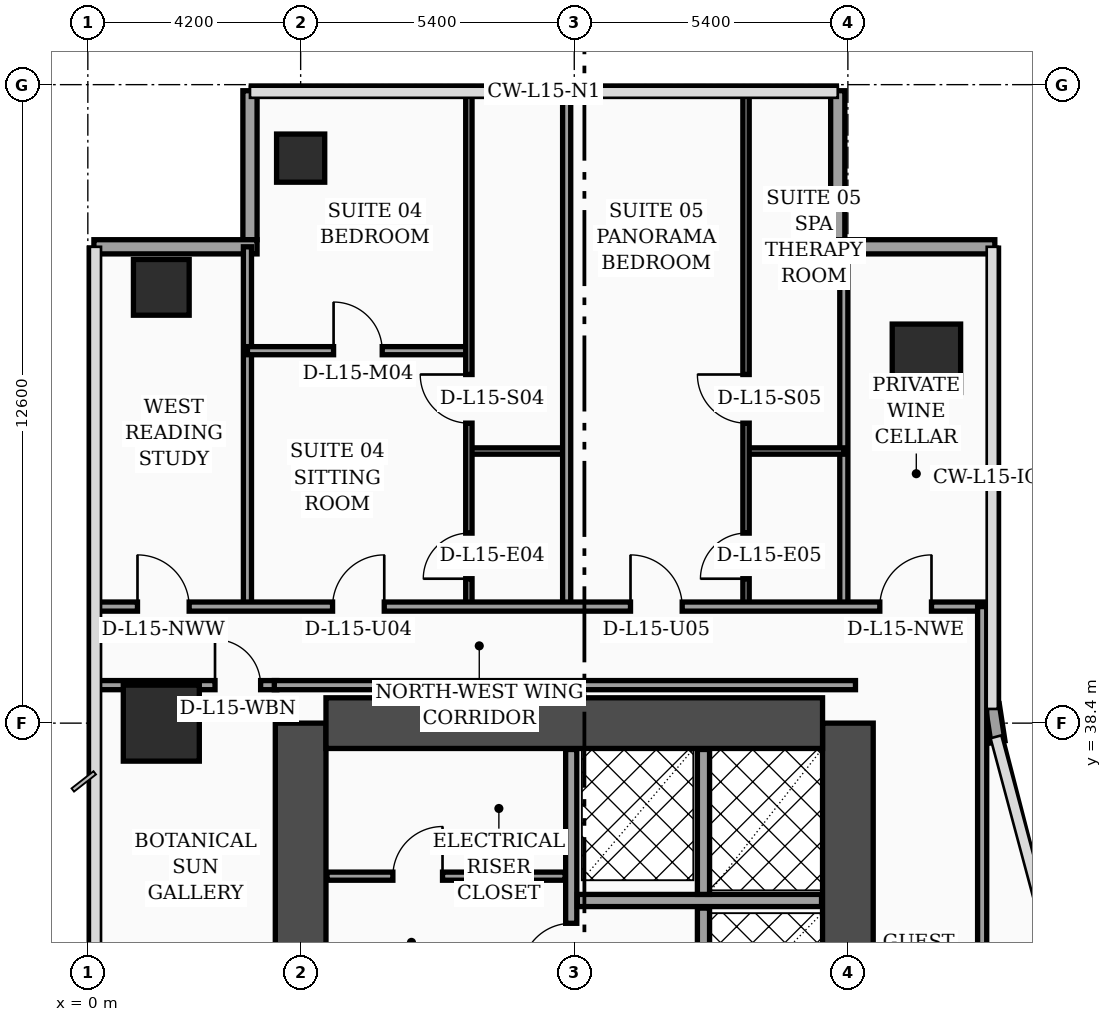
"""IFC4 building model, lengths in metres.
Left out: names, types, materials, properties, quantities, classifications, styles, units other than length and angle.
Written with IfcOpenShell. Run it as: python <this file> out.ifc"""

import sys

from ifc_helpers import new_model, si_unit, direction, frame, frame_2d, origin, origin_2d, place, context, subcontext, project, spatial, rectangle, hollow_rectangle, extrude, element, fill, save


model = new_model("IFC4")
c1 = context("Model", 3, precision=1e-05, world=origin(), true_north=direction((0.0, 1.0)))
c2 = subcontext(c1, "Body", "Model", "MODEL_VIEW")
j1 = project(units=[si_unit("LENGTHUNIT", "METRE"), si_unit("PLANEANGLEUNIT", "RADIAN")], contexts=[c1])
p1 = place(None, origin())
s1 = spatial("IfcSite", under=j1, at=p1, CompositionType="ELEMENT")
p2 = place(p1, origin())
s2 = spatial("IfcBuilding", under=s1, at=p2, CompositionType="ELEMENT")
p3 = place(p2, frame((0.0, 0.0, 66.0)))
s3 = spatial("IfcBuildingStorey", under=s2, at=p3, CompositionType="ELEMENT", Elevation=66.0)
p4 = place(p3, frame((4.2, 16.8, 0.0), z_axis=(0.0, 0.0, 1.0), x_axis=(0.0, 1.0, 0.0)))
e1 = element("IfcWall", 1, at=p4, inside=s3, PredefinedType="SHEAR", context=c2, shape_type="SweptSolid", body=[
    extrude(rectangle(XDim=21.6, YDim=1.0, at=frame_2d((10.8, 0.0))), origin(), (0.0, 0.0, 1.0), 3.56),
])
p5 = place(p3, frame((15.0, 16.8, 0.0), z_axis=(0.0, 0.0, 1.0), x_axis=(0.0, 1.0, 0.0)))
e2 = element("IfcWall", 2, at=p5, inside=s3, PredefinedType="SHEAR", context=c2, shape_type="SweptSolid", body=[
    extrude(rectangle(XDim=21.6, YDim=1.0, at=frame_2d((10.8, 0.0))), origin(), (0.0, 0.0, 1.0), 3.56),
])
p6 = place(p5, frame((8.65, 0.0, 0.0)))
e3 = element("IfcOpeningElement", 3, at=p6, cuts=e2, PredefinedType="OPENING", context=c2, shape_type="SweptSolid", body=[
    extrude(rectangle(XDim=1.1, YDim=2.2, at=frame_2d((0.55, 1.1))), frame((0.0, 0.51, 0.0), z_axis=(0.0, -1.0, 0.0), x_axis=(1.0, 0.0, 0.0)), (0.0, 0.0, 1.0), 1.02),
])
p7 = place(p5, frame((1.25, 0.0, 0.0)))
e4 = element("IfcOpeningElement", 4, at=p7, cuts=e2, PredefinedType="OPENING", context=c2, shape_type="SweptSolid", body=[
    extrude(rectangle(XDim=1.1, YDim=2.2, at=frame_2d((0.55, 1.1))), frame((0.0, 0.51, 0.0), z_axis=(0.0, -1.0, 0.0), x_axis=(1.0, 0.0, 0.0)), (0.0, 0.0, 1.0), 1.02),
])
p8 = place(p5, frame((3.8, 0.0, 0.0)))
e5 = element("IfcOpeningElement", 5, at=p8, cuts=e2, PredefinedType="OPENING", context=c2, shape_type="SweptSolid", body=[
    extrude(rectangle(XDim=1.1, YDim=2.2, at=frame_2d((0.55, 1.1))), frame((0.0, 0.51, 0.0), z_axis=(0.0, -1.0, 0.0), x_axis=(1.0, 0.0, 0.0)), (0.0, 0.0, 1.0), 1.02),
])
p9 = place(p5, frame((6.35, 0.0, 0.0)))
e6 = element("IfcOpeningElement", 6, at=p9, cuts=e2, PredefinedType="OPENING", context=c2, shape_type="SweptSolid", body=[
    extrude(rectangle(XDim=1.1, YDim=2.2, at=frame_2d((0.55, 1.1))), frame((0.0, 0.51, 0.0), z_axis=(0.0, -1.0, 0.0), x_axis=(1.0, 0.0, 0.0)), (0.0, 0.0, 1.0), 1.02),
])
p10 = place(p3, frame((4.7, 38.4, 0.0), z_axis=(0.0, 0.0, 1.0), x_axis=(1.0, 0.0, 0.0)))
e7 = element("IfcWall", 7, at=p10, inside=s3, PredefinedType="SHEAR", context=c2, shape_type="SweptSolid", body=[
    extrude(rectangle(XDim=9.8, YDim=1.0, at=frame_2d((4.9, 0.0))), origin(), (0.0, 0.0, 1.0), 3.56),
])
p11 = place(p3, frame((1.45, 38.4, 0.0), z_axis=(0.0, 0.0, 1.0), x_axis=(1.0, 0.0, 0.0)))
e8 = element("IfcColumn", 8, at=p11, inside=s3, PredefinedType="COLUMN", context=c2, shape_type="SweptSolid", body=[
    extrude(rectangle(XDim=1.5, YDim=1.5, at=origin_2d()), origin(), (0.0, 0.0, 1.0), 3.56),
])
p12 = place(p3, frame((1.45, 47.0, 0.0), z_axis=(0.0, 0.0, 1.0), x_axis=(1.0, 0.0, 0.0)))
e9 = element("IfcColumn", 9, at=p12, inside=s3, PredefinedType="COLUMN", context=c2, shape_type="SweptSolid", body=[
    extrude(hollow_rectangle(XDim=1.1, YDim=1.1, WallThickness=0.045, at=origin_2d()), origin(), (0.0, 0.0, 1.0), 3.56),
])
p13 = place(p3, frame((4.2, 49.55, 0.0), z_axis=(0.0, 0.0, 1.0), x_axis=(1.0, 0.0, 0.0)))
e10 = element("IfcColumn", 10, at=p13, inside=s3, PredefinedType="COLUMN", context=c2, shape_type="SweptSolid", body=[
    extrude(hollow_rectangle(XDim=0.95, YDim=0.95, WallThickness=0.04, at=origin_2d()), origin(), (0.0, 0.0, 1.0), 3.56),
])
p14 = place(p3, frame((16.55, 45.6, 0.0), z_axis=(0.0, 0.0, 1.0), x_axis=(1.0, 0.0, 0.0)))
e11 = element("IfcColumn", 11, at=p14, inside=s3, PredefinedType="COLUMN", context=c2, shape_type="SweptSolid", body=[
    extrude(rectangle(XDim=1.35, YDim=1.35, at=origin_2d()), origin(), (0.0, 0.0, 1.0), 3.56),
])
p15 = place(p3, frame((17.962, 38.03, 0.0), z_axis=(0.0, 0.0, 1.0), x_axis=(-0.15141125477, 0.988470855377, 0.0)))
e12 = element("IfcWall", 12, at=p15, inside=s3, PredefinedType="SOLIDWALL", context=c2, shape_type="SweptSolid", body=[
    extrude(rectangle(XDim=0.739, YDim=0.28, at=frame_2d((0.369, 0.0))), origin(), (0.0, 0.0, 1.0), 3.56),
])
p16 = place(p3, frame((17.9, 47.8, 0.0), z_axis=(0.0, 0.0, 1.0), x_axis=(-1.0, 0.0, 0.0)))
e13 = element("IfcWall", 13, at=p16, inside=s3, PredefinedType="SOLIDWALL", context=c2, shape_type="SweptSolid", body=[
    extrude(rectangle(XDim=3.24, YDim=0.28, at=frame_2d((1.62, 0.0))), origin(), (0.0, 0.0, 1.0), 3.56),
])
p17 = place(p3, frame((14.8, 47.94, 0.0), z_axis=(0.0, 0.0, 1.0), x_axis=(0.0, 1.0, 0.0)))
e14 = element("IfcWall", 14, at=p17, inside=s3, PredefinedType="SOLIDWALL", context=c2, shape_type="SweptSolid", body=[
    extrude(rectangle(XDim=2.94, YDim=0.28, at=frame_2d((1.47, 0.0))), origin(), (0.0, 0.0, 1.0), 3.56),
])
p18 = place(p3, frame((3.2, 50.88, 0.0), z_axis=(0.0, 0.0, 1.0), x_axis=(0.0, -1.0, 0.0)))
e15 = element("IfcWall", 15, at=p18, inside=s3, PredefinedType="SOLIDWALL", context=c2, shape_type="SweptSolid", body=[
    extrude(rectangle(XDim=2.94, YDim=0.28, at=frame_2d((1.47, 0.0))), origin(), (0.0, 0.0, 1.0), 3.04),
])
p19 = place(p3, frame((3.34, 47.8, 0.0), z_axis=(0.0, 0.0, 1.0), x_axis=(-1.0, 0.0, 0.0)))
e16 = element("IfcWall", 16, at=p19, inside=s3, PredefinedType="SOLIDWALL", context=c2, shape_type="SweptSolid", body=[
    extrude(rectangle(XDim=3.22, YDim=0.28, at=frame_2d((1.61, 0.0))), origin(), (0.0, 0.0, 1.0), 3.04),
])
p20 = place(p3, frame((4.72, 35.38, 0.0), z_axis=(0.0, 0.0, 1.0), x_axis=(1.0, 0.0, 0.0)))
e17 = element("IfcWall", 17, at=p20, inside=s3, PredefinedType="PARTITIONING", context=c2, shape_type="SweptSolid", body=[
    extrude(rectangle(XDim=4.7, YDim=0.16, at=frame_2d((2.35, 0.0))), origin(), (0.0, 0.0, 1.0), 3.56),
])
p21 = place(p20, frame((1.3, 0.0, 0.0)))
e18 = element("IfcOpeningElement", 18, at=p21, cuts=e17, PredefinedType="OPENING", context=c2, shape_type="SweptSolid", body=[
    extrude(rectangle(XDim=0.98, YDim=2.15, at=frame_2d((0.49, 1.075))), frame((0.0, 0.09, 0.0), z_axis=(0.0, -1.0, 0.0), x_axis=(1.0, 0.0, 0.0)), (0.0, 0.0, 1.0), 0.18),
])
p22 = place(p3, frame((9.54, 32.92, 0.0), z_axis=(0.0, 0.0, 1.0), x_axis=(0.0, 1.0, 0.0)))
e19 = element("IfcWall", 19, at=p22, inside=s3, PredefinedType="SOLIDWALL", context=c2, shape_type="SweptSolid", body=[
    extrude(rectangle(XDim=4.96, YDim=0.22, at=frame_2d((2.48, 0.0))), origin(), (0.0, 0.0, 1.0), 3.56),
])
p23 = place(p22, frame((0.55, 0.0, 0.0)))
e20 = element("IfcOpeningElement", 20, at=p23, cuts=e19, PredefinedType="OPENING", context=c2, shape_type="SweptSolid", body=[
    extrude(rectangle(XDim=0.98, YDim=2.15, at=frame_2d((0.49, 1.075))), frame((0.0, 0.12, 0.0), z_axis=(0.0, -1.0, 0.0), x_axis=(1.0, 0.0, 0.0)), (0.0, 0.0, 1.0), 0.24),
])
p24 = place(p3, frame((12.15, 27.0, 0.0), z_axis=(0.0, 0.0, 1.0), x_axis=(0.0, 1.0, 0.0)))
e21 = element("IfcWall", 21, at=p24, inside=s3, PredefinedType="SOLIDWALL", context=c2, shape_type="SweptSolid", body=[
    extrude(rectangle(XDim=7.75, YDim=0.24, at=frame_2d((3.875, 0.0))), origin(), (0.0, 0.0, 1.0), 3.56),
])
p25 = place(p3, frame((9.66, 34.9, 0.0), z_axis=(0.0, 0.0, 1.0), x_axis=(1.0, 0.0, 0.0)))
e22 = element("IfcWall", 22, at=p25, inside=s3, PredefinedType="SOLIDWALL", context=c2, shape_type="SweptSolid", body=[
    extrude(rectangle(XDim=4.82, YDim=0.24, at=frame_2d((2.41, 0.0))), origin(), (0.0, 0.0, 1.0), 3.56),
])
p26 = place(p3, frame((12.15, 35.02, 0.0), z_axis=(0.0, 0.0, 1.0), x_axis=(0.0, 1.0, 0.0)))
e23 = element("IfcWall", 23, at=p26, inside=s3, PredefinedType="SOLIDWALL", context=c2, shape_type="SweptSolid", body=[
    extrude(rectangle(XDim=2.86, YDim=0.24, at=frame_2d((1.43, 0.0))), origin(), (0.0, 0.0, 1.0), 3.56),
])
p27 = place(p3, frame((0.08, 39.15, 0.0), z_axis=(0.0, 0.0, 1.0), x_axis=(1.0, 0.0, 0.0)))
e24 = element("IfcWall", 24, at=p27, inside=s3, PredefinedType="PARTITIONING", context=c2, shape_type="SweptSolid", body=[
    extrude(rectangle(XDim=3.65, YDim=0.18, at=frame_2d((1.825, 0.0))), origin(), (0.0, 0.0, 1.0), 2.84),
])
p28 = place(p27, frame((2.43, 0.0, 0.0)))
e25 = element("IfcOpeningElement", 25, at=p28, cuts=e24, PredefinedType="OPENING", context=c2, shape_type="SweptSolid", body=[
    extrude(rectangle(XDim=0.9, YDim=2.15, at=frame_2d((0.45, 1.075))), frame((0.0, 0.1, 0.0), z_axis=(0.0, -1.0, 0.0), x_axis=(1.0, 0.0, 0.0)), (0.0, 0.0, 1.0), 0.2),
])
p29 = place(p3, frame((3.15, 40.7, 0.0), z_axis=(0.0, 0.0, 1.0), x_axis=(0.0, 1.0, 0.0)))
e26 = element("IfcWall", 26, at=p29, inside=s3, PredefinedType="PARTITIONING", context=c2, shape_type="SweptSolid", body=[
    extrude(rectangle(XDim=7.1, YDim=0.16, at=frame_2d((3.55, 0.0))), origin(), (0.0, 0.0, 1.0), 3.14),
])
p30 = place(p3, frame((14.92, 40.7, 0.0), z_axis=(0.0, 0.0, 1.0), x_axis=(0.0, 1.0, 0.0)))
e27 = element("IfcWall", 27, at=p30, inside=s3, PredefinedType="PARTITIONING", context=c2, shape_type="SweptSolid", body=[
    extrude(rectangle(XDim=7.1, YDim=0.16, at=frame_2d((3.55, 0.0))), origin(), (0.0, 0.0, 1.0), 3.04),
])
p31 = place(p3, frame((7.52, 43.77, 0.0), z_axis=(0.0, 0.0, 1.0), x_axis=(1.0, 0.0, 0.0)))
e28 = element("IfcWall", 28, at=p31, inside=s3, PredefinedType="PARTITIONING", context=c2, shape_type="SweptSolid", body=[
    extrude(rectangle(XDim=1.93, YDim=0.125, at=frame_2d((0.965, 0.0))), origin(), (0.0, 0.0, 1.0), 3.56),
])
p32 = place(p3, frame((3.15, 45.75, 0.0), z_axis=(0.0, 0.0, 1.0), x_axis=(1.0, 0.0, 0.0)))
e29 = element("IfcWall", 29, at=p32, inside=s3, PredefinedType="PARTITIONING", context=c2, shape_type="SweptSolid", body=[
    extrude(rectangle(XDim=4.37, YDim=0.16, at=frame_2d((2.185, 0.0))), origin(), (0.0, 0.0, 1.0), 2.84),
])
p33 = place(p32, frame((1.7, 0.0, 0.0)))
e30 = element("IfcOpeningElement", 30, at=p33, cuts=e29, PredefinedType="OPENING", context=c2, shape_type="SweptSolid", body=[
    extrude(rectangle(XDim=0.96, YDim=2.2, at=frame_2d((0.48, 1.1))), frame((0.0, 0.09, 0.0), z_axis=(0.0, -1.0, 0.0), x_axis=(1.0, 0.0, 0.0)), (0.0, 0.0, 1.0), 0.18),
])
p34 = place(p3, frame((7.52, 40.7, 0.0), z_axis=(0.0, 0.0, 1.0), x_axis=(0.0, 1.0, 0.0)))
e31 = element("IfcWall", 31, at=p34, inside=s3, PredefinedType="PARTITIONING", context=c2, shape_type="SweptSolid", body=[
    extrude(rectangle(XDim=10.24, YDim=0.125, at=frame_2d((5.12, 0.0))), origin(), (0.0, 0.0, 1.0), 3.04),
])
p35 = place(p34, frame((0.55, 0.0, 0.0)))
e32 = element("IfcOpeningElement", 32, at=p35, cuts=e31, PredefinedType="OPENING", context=c2, shape_type="SweptSolid", body=[
    extrude(rectangle(XDim=0.9, YDim=2.15, at=frame_2d((0.45, 1.075))), frame((0.0, 0.073, 0.0), z_axis=(0.0, -1.0, 0.0), x_axis=(1.0, 0.0, 0.0)), (0.0, 0.0, 1.0), 0.145),
])
p36 = place(p34, frame((3.62, 0.0, 0.0)))
e33 = element("IfcOpeningElement", 33, at=p36, cuts=e31, PredefinedType="OPENING", context=c2, shape_type="SweptSolid", body=[
    extrude(rectangle(XDim=0.96, YDim=2.2, at=frame_2d((0.48, 1.1))), frame((0.0, 0.073, 0.0), z_axis=(0.0, -1.0, 0.0), x_axis=(1.0, 0.0, 0.0)), (0.0, 0.0, 1.0), 0.145),
])
p37 = place(p3, frame((12.99, 43.77, 0.0), z_axis=(0.0, 0.0, 1.0), x_axis=(1.0, 0.0, 0.0)))
e34 = element("IfcWall", 34, at=p37, inside=s3, PredefinedType="PARTITIONING", context=c2, shape_type="SweptSolid", body=[
    extrude(rectangle(XDim=1.93, YDim=0.125, at=frame_2d((0.965, 0.0))), origin(), (0.0, 0.0, 1.0), 3.56),
])
p38 = place(p3, frame((12.99, 40.7, 0.0), z_axis=(0.0, 0.0, 1.0), x_axis=(0.0, 1.0, 0.0)))
e35 = element("IfcWall", 35, at=p38, inside=s3, PredefinedType="PARTITIONING", context=c2, shape_type="SweptSolid", body=[
    extrude(rectangle(XDim=10.24, YDim=0.125, at=frame_2d((5.12, 0.0))), origin(), (0.0, 0.0, 1.0), 3.04),
])
p39 = place(p38, frame((0.55, 0.0, 0.0)))
e36 = element("IfcOpeningElement", 36, at=p39, cuts=e35, PredefinedType="OPENING", context=c2, shape_type="SweptSolid", body=[
    extrude(rectangle(XDim=0.9, YDim=2.15, at=frame_2d((0.45, 1.075))), frame((0.0, 0.073, 0.0), z_axis=(0.0, -1.0, 0.0), x_axis=(1.0, 0.0, 0.0)), (0.0, 0.0, 1.0), 0.145),
])
p40 = place(p38, frame((3.62, 0.0, 0.0)))
e37 = element("IfcOpeningElement", 37, at=p40, cuts=e35, PredefinedType="OPENING", context=c2, shape_type="SweptSolid", body=[
    extrude(rectangle(XDim=0.96, YDim=2.2, at=frame_2d((0.48, 1.1))), frame((0.0, 0.073, 0.0), z_axis=(0.0, -1.0, 0.0), x_axis=(1.0, 0.0, 0.0)), (0.0, 0.0, 1.0), 0.145),
])
p41 = place(p3, frame((9.45, 40.7, 0.0), z_axis=(0.0, 0.0, 1.0), x_axis=(0.0, 1.0, 0.0)))
e38 = element("IfcWall", 38, at=p41, inside=s3, PredefinedType="PARTITIONING", context=c2, shape_type="SweptSolid", body=[
    extrude(rectangle(XDim=10.24, YDim=0.16, at=frame_2d((5.12, 0.0))), origin(), (0.0, 0.0, 1.0), 3.04),
])
p42 = place(p3, frame((0.08, 40.7, 0.0), z_axis=(0.0, 0.0, 1.0), x_axis=(1.0, 0.0, 0.0)))
e39 = element("IfcWall", 39, at=p42, inside=s3, PredefinedType="PARTITIONING", context=c2, shape_type="SweptSolid", body=[
    extrude(rectangle(XDim=17.77, YDim=0.18, at=frame_2d((8.885, 0.0))), origin(), (0.0, 0.0, 1.0), 2.84),
])
p43 = place(p42, frame((0.9, 0.0, 0.0)))
e40 = element("IfcOpeningElement", 40, at=p43, cuts=e39, PredefinedType="OPENING", context=c2, shape_type="SweptSolid", body=[
    extrude(rectangle(XDim=1.02, YDim=2.2, at=frame_2d((0.51, 1.1))), frame((0.0, 0.1, 0.0), z_axis=(0.0, -1.0, 0.0), x_axis=(1.0, 0.0, 0.0)), (0.0, 0.0, 1.0), 0.2),
])
p44 = place(p42, frame((4.75, 0.0, 0.0)))
e41 = element("IfcOpeningElement", 41, at=p44, cuts=e39, PredefinedType="OPENING", context=c2, shape_type="SweptSolid", body=[
    extrude(rectangle(XDim=1.02, YDim=2.2, at=frame_2d((0.51, 1.1))), frame((0.0, 0.1, 0.0), z_axis=(0.0, -1.0, 0.0), x_axis=(1.0, 0.0, 0.0)), (0.0, 0.0, 1.0), 0.2),
])
p45 = place(p42, frame((10.63, 0.0, 0.0)))
e42 = element("IfcOpeningElement", 42, at=p45, cuts=e39, PredefinedType="OPENING", context=c2, shape_type="SweptSolid", body=[
    extrude(rectangle(XDim=1.02, YDim=2.2, at=frame_2d((0.51, 1.1))), frame((0.0, 0.1, 0.0), z_axis=(0.0, -1.0, 0.0), x_axis=(1.0, 0.0, 0.0)), (0.0, 0.0, 1.0), 0.2),
])
p46 = place(p42, frame((15.55, 0.0, 0.0)))
e43 = element("IfcOpeningElement", 43, at=p46, cuts=e39, PredefinedType="OPENING", context=c2, shape_type="SweptSolid", body=[
    extrude(rectangle(XDim=1.02, YDim=2.2, at=frame_2d((0.51, 1.1))), frame((0.0, 0.1, 0.0), z_axis=(0.0, -1.0, 0.0), x_axis=(1.0, 0.0, 0.0)), (0.0, 0.0, 1.0), 0.2),
])
p47 = place(p3, frame((17.65, 24.3, 0.0), z_axis=(0.0, 0.0, 1.0), x_axis=(0.0, 1.0, 0.0)))
e44 = element("IfcWall", 44, at=p47, inside=s3, PredefinedType="PARTITIONING", context=c2, shape_type="SweptSolid", body=[
    extrude(rectangle(XDim=16.4, YDim=0.18, at=frame_2d((8.2, 0.0))), origin(), (0.0, 0.0, 1.0), 2.84),
])
p48 = place(p3, frame((3.68, 39.15, 0.0), z_axis=(0.0, 0.0, 1.0), x_axis=(1.0, 0.0, 0.0)))
e45 = element("IfcWall", 45, at=p48, inside=s3, PredefinedType="PARTITIONING", context=c2, shape_type="SweptSolid", body=[
    extrude(rectangle(XDim=11.47, YDim=0.18, at=frame_2d((5.735, 0.0))), origin(), (0.0, 0.0, 1.0), 2.84),
])
p49 = place(p21, origin())
e46 = element("IfcDoor", 46, at=p49, inside=s3, OperationType="SINGLE_SWING_RIGHT", PredefinedType="DOOR", context=c2, shape_type="SweptSolid", body=[
    extrude(rectangle(XDim=0.98, YDim=2.15, at=frame_2d((0.49, 1.075))), frame((0.0, 0.025, 0.0), z_axis=(0.0, -1.0, 0.0), x_axis=(1.0, 0.0, 0.0)), (0.0, 0.0, 1.0), 0.05),
])
fill(e18, e46)
p50 = place(p23, origin())
e47 = element("IfcDoor", 47, at=p50, inside=s3, OperationType="SINGLE_SWING_LEFT", PredefinedType="DOOR", context=c2, shape_type="SweptSolid", body=[
    extrude(rectangle(XDim=0.98, YDim=2.15, at=frame_2d((0.49, 1.075))), frame((0.0, 0.025, 0.0), z_axis=(0.0, -1.0, 0.0), x_axis=(1.0, 0.0, 0.0)), (0.0, 0.0, 1.0), 0.05),
])
fill(e20, e47)
p51 = place(p28, origin())
e48 = element("IfcDoor", 48, at=p51, inside=s3, OperationType="SINGLE_SWING_LEFT", PredefinedType="DOOR", context=c2, shape_type="SweptSolid", body=[
    extrude(rectangle(XDim=0.9, YDim=2.15, at=frame_2d((0.45, 1.075))), frame((0.0, 0.025, 0.0), z_axis=(0.0, -1.0, 0.0), x_axis=(1.0, 0.0, 0.0)), (0.0, 0.0, 1.0), 0.05),
])
fill(e25, e48)
p52 = place(p33, origin())
e49 = element("IfcDoor", 49, at=p52, inside=s3, OperationType="SINGLE_SWING_LEFT", PredefinedType="DOOR", context=c2, shape_type="SweptSolid", body=[
    extrude(rectangle(XDim=0.96, YDim=2.2, at=frame_2d((0.48, 1.1))), frame((0.0, 0.025, 0.0), z_axis=(0.0, -1.0, 0.0), x_axis=(1.0, 0.0, 0.0)), (0.0, 0.0, 1.0), 0.05),
])
fill(e30, e49)
p53 = place(p35, origin())
e50 = element("IfcDoor", 50, at=p53, inside=s3, OperationType="SINGLE_SWING_LEFT", PredefinedType="DOOR", context=c2, shape_type="SweptSolid", body=[
    extrude(rectangle(XDim=0.9, YDim=2.15, at=frame_2d((0.45, 1.075))), frame((0.0, 0.025, 0.0), z_axis=(0.0, -1.0, 0.0), x_axis=(1.0, 0.0, 0.0)), (0.0, 0.0, 1.0), 0.05),
])
fill(e32, e50)
p54 = place(p36, origin())
e51 = element("IfcDoor", 51, at=p54, inside=s3, OperationType="SINGLE_SWING_RIGHT", PredefinedType="DOOR", context=c2, shape_type="SweptSolid", body=[
    extrude(rectangle(XDim=0.96, YDim=2.2, at=frame_2d((0.48, 1.1))), frame((0.0, 0.025, 0.0), z_axis=(0.0, -1.0, 0.0), x_axis=(1.0, 0.0, 0.0)), (0.0, 0.0, 1.0), 0.05),
])
fill(e33, e51)
p55 = place(p39, origin())
e52 = element("IfcDoor", 52, at=p55, inside=s3, OperationType="SINGLE_SWING_LEFT", PredefinedType="DOOR", context=c2, shape_type="SweptSolid", body=[
    extrude(rectangle(XDim=0.9, YDim=2.15, at=frame_2d((0.45, 1.075))), frame((0.0, 0.025, 0.0), z_axis=(0.0, -1.0, 0.0), x_axis=(1.0, 0.0, 0.0)), (0.0, 0.0, 1.0), 0.05),
])
fill(e36, e52)
p56 = place(p40, origin())
e53 = element("IfcDoor", 53, at=p56, inside=s3, OperationType="SINGLE_SWING_RIGHT", PredefinedType="DOOR", context=c2, shape_type="SweptSolid", body=[
    extrude(rectangle(XDim=0.96, YDim=2.2, at=frame_2d((0.48, 1.1))), frame((0.0, 0.025, 0.0), z_axis=(0.0, -1.0, 0.0), x_axis=(1.0, 0.0, 0.0)), (0.0, 0.0, 1.0), 0.05),
])
fill(e37, e53)
p57 = place(p43, origin())
e54 = element("IfcDoor", 54, at=p57, inside=s3, OperationType="SINGLE_SWING_LEFT", PredefinedType="DOOR", context=c2, shape_type="SweptSolid", body=[
    extrude(rectangle(XDim=1.02, YDim=2.2, at=frame_2d((0.51, 1.1))), frame((0.0, 0.025, 0.0), z_axis=(0.0, -1.0, 0.0), x_axis=(1.0, 0.0, 0.0)), (0.0, 0.0, 1.0), 0.05),
])
fill(e40, e54)
p58 = place(p44, origin())
e55 = element("IfcDoor", 55, at=p58, inside=s3, OperationType="SINGLE_SWING_RIGHT", PredefinedType="DOOR", context=c2, shape_type="SweptSolid", body=[
    extrude(rectangle(XDim=1.02, YDim=2.2, at=frame_2d((0.51, 1.1))), frame((0.0, 0.025, 0.0), z_axis=(0.0, -1.0, 0.0), x_axis=(1.0, 0.0, 0.0)), (0.0, 0.0, 1.0), 0.05),
])
fill(e41, e55)
p59 = place(p45, origin())
e56 = element("IfcDoor", 56, at=p59, inside=s3, OperationType="SINGLE_SWING_LEFT", PredefinedType="DOOR", context=c2, shape_type="SweptSolid", body=[
    extrude(rectangle(XDim=1.02, YDim=2.2, at=frame_2d((0.51, 1.1))), frame((0.0, 0.025, 0.0), z_axis=(0.0, -1.0, 0.0), x_axis=(1.0, 0.0, 0.0)), (0.0, 0.0, 1.0), 0.05),
])
fill(e42, e56)
p60 = place(p46, origin())
e57 = element("IfcDoor", 57, at=p60, inside=s3, OperationType="SINGLE_SWING_RIGHT", PredefinedType="DOOR", context=c2, shape_type="SweptSolid", body=[
    extrude(rectangle(XDim=1.02, YDim=2.2, at=frame_2d((0.51, 1.1))), frame((0.0, 0.025, 0.0), z_axis=(0.0, -1.0, 0.0), x_axis=(1.0, 0.0, 0.0)), (0.0, 0.0, 1.0), 0.05),
])
fill(e43, e57)
save(model, sys.argv[1])
